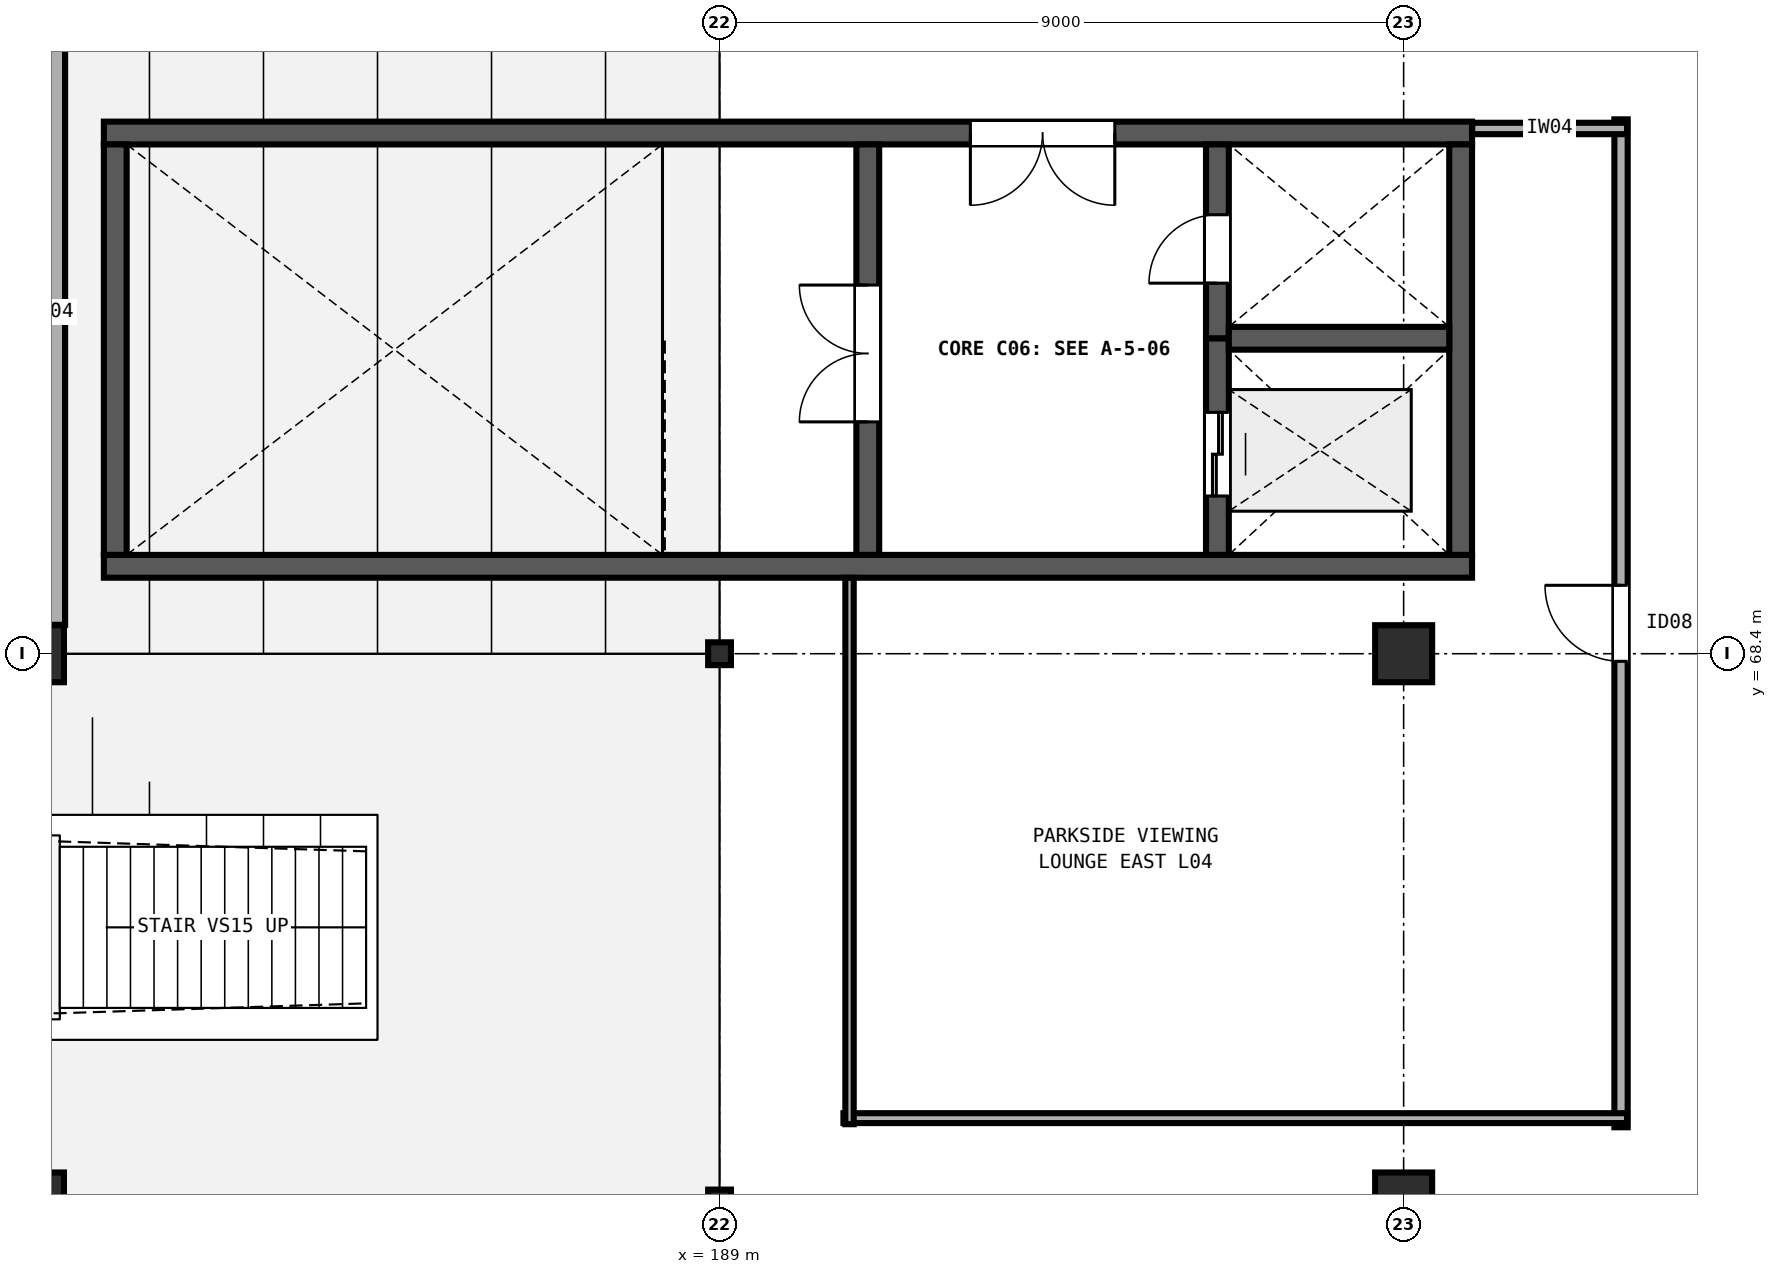
"""IFC4 building model, lengths in metres.
Left out: names, types, materials, properties, quantities, classifications, styles, units other than length and angle.
Written with IfcOpenShell. Run it as: python <this file> out.ifc"""

import sys

from ifc_helpers import new_model, si_unit, direction, frame, frame_2d, origin, origin_2d, place, context, subcontext, project, spatial, rectangle, hollow_rectangle, extrude, element, fill, save


model = new_model("IFC4")
c1 = context("Model", 3, precision=1e-05, world=origin(), true_north=direction((0.0, 1.0)))
c2 = subcontext(c1, "Body", "Model", "MODEL_VIEW")
j1 = project(units=[si_unit("LENGTHUNIT", "METRE"), si_unit("PLANEANGLEUNIT", "RADIAN")], contexts=[c1])
p1 = place(None, origin())
s1 = spatial("IfcSite", under=j1, at=p1, CompositionType="ELEMENT")
p2 = place(p1, origin())
s2 = spatial("IfcBuilding", under=s1, at=p2, CompositionType="ELEMENT")
p3 = place(p2, frame((0.0, 0.0, 19.2)))
s3 = spatial("IfcBuildingStorey", under=s2, at=p3, CompositionType="ELEMENT", Elevation=19.2)
for number, where, z_axis, x_axis in (
    (1, (180.0, 61.2, 0.0), (0.0, 0.0, 1.0), (1.0, 0.0, 0.0)),
    (2, (180.0, 68.4, 0.0), (0.0, 0.0, 1.0), (1.0, 0.0, 0.0)),
):
    element("IfcColumn", number, at=place(p3, frame(where, z_axis=z_axis, x_axis=x_axis)), inside=s3, PredefinedType="COLUMN", context=c2, shape_type="SweptSolid", body=[
        extrude(rectangle(XDim=0.75, YDim=0.75, at=origin_2d()), origin(), (0.0, 0.0, 1.0), 4.8),
    ])
for number, where, z_axis, x_axis in (
    (3, (189.0, 61.2, 0.0), (0.0, 0.0, 1.0), (1.0, 0.0, 0.0)),
    (4, (189.0, 68.4, 0.0), (0.0, 0.0, 1.0), (1.0, 0.0, 0.0)),
):
    element("IfcColumn", number, at=place(p3, frame(where, z_axis=z_axis, x_axis=x_axis)), inside=s3, PredefinedType="COLUMN", context=c2, shape_type="SweptSolid", body=[
        extrude(hollow_rectangle(XDim=0.3, YDim=0.3, WallThickness=0.012, at=origin_2d()), origin(), (0.0, 0.0, 1.0), 4.8),
    ])
for number, where, z_axis, x_axis in (
    (5, (198.0, 61.2, 0.0), (0.0, 0.0, 1.0), (1.0, 0.0, 0.0)),
    (6, (198.0, 68.4, 0.0), (0.0, 0.0, 1.0), (1.0, 0.0, 0.0)),
):
    element("IfcColumn", number, at=place(p3, frame(where, z_axis=z_axis, x_axis=x_axis)), inside=s3, PredefinedType="COLUMN", context=c2, shape_type="SweptSolid", body=[
        extrude(rectangle(XDim=0.75, YDim=0.75, at=origin_2d()), origin(), (0.0, 0.0, 1.0), 4.8),
    ])
p4 = place(p3, frame((180.9, 69.55, 0.0), z_axis=(0.0, 0.0, 1.0), x_axis=(1.0, 0.0, 0.0)))
e7 = element("IfcWall", 7, at=p4, inside=s3, PredefinedType="SHEAR", context=c2, shape_type="SweptSolid", body=[
    extrude(rectangle(XDim=18.0, YDim=0.3, at=frame_2d((9.0, 0.0))), origin(), (0.0, 0.0, 1.0), 4.555),
])
p5 = place(p3, frame((198.9, 75.25, 0.0), z_axis=(0.0, 0.0, 1.0), x_axis=(-1.0, 0.0, 0.0)))
e8 = element("IfcWall", 8, at=p5, inside=s3, PredefinedType="SHEAR", context=c2, shape_type="SweptSolid", body=[
    extrude(rectangle(XDim=18.0, YDim=0.3, at=frame_2d((9.0, 0.0))), origin(), (0.0, 0.0, 1.0), 4.555),
])
p6 = place(p5, frame((4.7, 0.0, 0.0)))
e9 = element("IfcOpeningElement", 9, at=p6, cuts=e8, PredefinedType="OPENING", context=c2, shape_type="SweptSolid", body=[
    extrude(rectangle(XDim=1.9, YDim=2.25, at=frame_2d((0.95, 1.125))), frame((0.0, 0.16, 0.0), z_axis=(0.0, -1.0, 0.0), x_axis=(1.0, 0.0, 0.0)), (0.0, 0.0, 1.0), 0.32),
])
for number, where, z_axis, x_axis in (
    (10, (181.05, 75.1, 0.0), (0.0, 0.0, 1.0), (0.0, -1.0, 0.0)),
    (11, (198.75, 69.7, 0.0), (0.0, 0.0, 1.0), (0.0, 1.0, 0.0)),
):
    element("IfcWall", number, at=place(p3, frame(where, z_axis=z_axis, x_axis=x_axis)), inside=s3, PredefinedType="SHEAR", context=c2, shape_type="SweptSolid", body=[
        extrude(rectangle(XDim=5.4, YDim=0.3, at=frame_2d((2.7, 0.0))), origin(), (0.0, 0.0, 1.0), 4.555),
    ])
p7 = place(p3, frame((190.95, 69.7, 0.0), z_axis=(0.0, 0.0, 1.0), x_axis=(0.0, 1.0, 0.0)))
e12 = element("IfcWall", 12, at=p7, inside=s3, PredefinedType="SHEAR", context=c2, shape_type="SweptSolid", body=[
    extrude(rectangle(XDim=5.4, YDim=0.3, at=frame_2d((2.7, 0.0))), origin(), (0.0, 0.0, 1.0), 4.555),
])
p8 = place(p7, frame((1.75, 0.0, 0.0)))
e13 = element("IfcOpeningElement", 13, at=p8, cuts=e12, PredefinedType="OPENING", context=c2, shape_type="SweptSolid", body=[
    extrude(rectangle(XDim=1.8, YDim=2.25, at=frame_2d((0.9, 1.125))), frame((0.0, 0.16, 0.0), z_axis=(0.0, -1.0, 0.0), x_axis=(1.0, 0.0, 0.0)), (0.0, 0.0, 1.0), 0.32),
])
p9 = place(p3, frame((195.55, 69.7, 0.0), z_axis=(0.0, 0.0, 1.0), x_axis=(0.0, 1.0, 0.0)))
e14 = element("IfcWall", 14, at=p9, inside=s3, PredefinedType="SHEAR", context=c2, shape_type="SweptSolid", body=[
    extrude(rectangle(XDim=2.85, YDim=0.3, at=frame_2d((1.425, 0.0))), origin(), (0.0, 0.0, 1.0), 4.555),
])
p10 = place(p9, frame((0.775, 0.0, 0.0)))
e15 = element("IfcOpeningElement", 15, at=p10, cuts=e14, PredefinedType="OPENING", context=c2, shape_type="SweptSolid", body=[
    extrude(rectangle(XDim=1.1, YDim=2.1, at=frame_2d((0.55, 1.05))), frame((0.0, 0.16, 0.0), z_axis=(0.0, -1.0, 0.0), x_axis=(1.0, 0.0, 0.0)), (0.0, 0.0, 1.0), 0.32),
])
p11 = place(p3, frame((195.55, 72.55, 0.0), z_axis=(0.0, 0.0, 1.0), x_axis=(0.0, 1.0, 0.0)))
e16 = element("IfcWall", 16, at=p11, inside=s3, PredefinedType="SHEAR", context=c2, shape_type="SweptSolid", body=[
    extrude(rectangle(XDim=2.55, YDim=0.3, at=frame_2d((1.275, 0.0))), origin(), (0.0, 0.0, 1.0), 4.555),
])
p12 = place(p11, frame((0.725, 0.0, 0.0)))
e17 = element("IfcOpeningElement", 17, at=p12, cuts=e16, PredefinedType="OPENING", context=c2, shape_type="SweptSolid", body=[
    extrude(rectangle(XDim=0.9, YDim=2.1, at=frame_2d((0.45, 1.05))), frame((0.0, 0.16, 0.0), z_axis=(0.0, -1.0, 0.0), x_axis=(1.0, 0.0, 0.0)), (0.0, 0.0, 1.0), 0.32),
])
p13 = place(p3, frame((195.7, 72.55, 0.0), z_axis=(0.0, 0.0, 1.0), x_axis=(1.0, 0.0, 0.0)))
e18 = element("IfcWall", 18, at=p13, inside=s3, PredefinedType="SHEAR", context=c2, shape_type="SweptSolid", body=[
    extrude(rectangle(XDim=2.9, YDim=0.3, at=frame_2d((1.45, 0.0))), origin(), (0.0, 0.0, 1.0), 4.555),
])
p14 = place(p3, frame((180.2, 68.78, 0.0), z_axis=(0.0, 0.0, 1.0), x_axis=(0.0, 1.0, 0.0)))
e19 = element("IfcWall", 19, at=p14, inside=s3, PredefinedType="SOLIDWALL", context=c2, shape_type="SweptSolid", body=[
    extrude(rectangle(XDim=8.24, YDim=0.38, at=frame_2d((4.12, 0.0))), origin(), (0.0, 0.0, 1.0), 3.28),
])
p15 = place(p3, frame((200.86, 62.17, 0.0), z_axis=(0.0, 0.0, 1.0), x_axis=(0.0, 1.0, 0.0)))
e20 = element("IfcWall", 20, at=p15, inside=s3, PredefinedType="PARTITIONING", context=c2, shape_type="SweptSolid", body=[
    extrude(rectangle(XDim=13.26, YDim=0.175, at=frame_2d((6.63, 0.0))), origin(), (0.0, 0.0, 1.0), 3.28),
])
p16 = place(p15, frame((6.13, 0.0, 0.0)))
e21 = element("IfcOpeningElement", 21, at=p16, cuts=e20, PredefinedType="OPENING", context=c2, shape_type="SweptSolid", body=[
    extrude(rectangle(XDim=1.0, YDim=2.1, at=frame_2d((0.5, 1.05))), frame((0.0, 0.097, 0.0), z_axis=(0.0, -1.0, 0.0), x_axis=(1.0, 0.0, 0.0)), (0.0, 0.0, 1.0), 0.195),
])
p17 = place(p3, frame((198.902, 75.31, 0.0), z_axis=(0.0, 0.0, 1.0), x_axis=(1.0, 0.0, 0.0)))
e22 = element("IfcWall", 22, at=p17, inside=s3, PredefinedType="PARTITIONING", context=c2, shape_type="SweptSolid", body=[
    extrude(rectangle(XDim=2.038, YDim=0.15, at=frame_2d((1.019, 0.0))), origin(), (0.0, 0.0, 1.0), 3.28),
])
p18 = place(p3, frame((200.94, 62.29, 0.0), z_axis=(0.0, 0.0, 1.0), x_axis=(-1.0, 0.0, 0.0)))
e23 = element("IfcWall", 23, at=p18, inside=s3, PredefinedType="PARTITIONING", context=c2, shape_type="SweptSolid", body=[
    extrude(rectangle(XDim=10.31, YDim=0.13, at=frame_2d((5.155, 0.0))), origin(), (0.0, 0.0, 1.0), 3.28),
])
p19 = place(p3, frame((190.71, 62.21, 0.0), z_axis=(0.0, 0.0, 1.0), x_axis=(0.0, 1.0, 0.0)))
e24 = element("IfcWall", 24, at=p19, inside=s3, PredefinedType="PARTITIONING", context=c2, shape_type="SweptSolid", body=[
    extrude(rectangle(XDim=7.188, YDim=0.11, at=frame_2d((3.594, 0.0))), origin(), (0.0, 0.0, 1.0), 3.28),
])
p20 = place(p8, origin())
e25 = element("IfcDoor", 25, at=p20, inside=s3, OperationType="DOUBLE_DOOR_SINGLE_SWING", PredefinedType="DOOR", context=c2, shape_type="SweptSolid", body=[
    extrude(rectangle(XDim=1.8, YDim=2.25, at=frame_2d((0.9, 1.125))), frame((0.0, 0.025, 0.0), z_axis=(0.0, -1.0, 0.0), x_axis=(1.0, 0.0, 0.0)), (0.0, 0.0, 1.0), 0.05),
])
fill(e13, e25)
p21 = place(p12, origin())
e26 = element("IfcDoor", 26, at=p21, inside=s3, OperationType="SINGLE_SWING_LEFT", PredefinedType="DOOR", context=c2, shape_type="SweptSolid", body=[
    extrude(rectangle(XDim=0.9, YDim=2.1, at=frame_2d((0.45, 1.05))), frame((0.0, 0.025, 0.0), z_axis=(0.0, -1.0, 0.0), x_axis=(1.0, 0.0, 0.0)), (0.0, 0.0, 1.0), 0.05),
])
fill(e17, e26)
p22 = place(p10, origin())
e27 = element("IfcDoor", 27, at=p22, inside=s3, OperationType="DOUBLE_DOOR_SLIDING", PredefinedType="DOOR", context=c2, shape_type="SweptSolid", body=[
    extrude(rectangle(XDim=1.1, YDim=2.1, at=frame_2d((0.55, 1.05))), frame((0.0, 0.025, 0.0), z_axis=(0.0, -1.0, 0.0), x_axis=(1.0, 0.0, 0.0)), (0.0, 0.0, 1.0), 0.05),
])
fill(e15, e27)
p23 = place(p6, origin())
e28 = element("IfcDoor", 28, at=p23, inside=s3, OperationType="DOUBLE_DOOR_SINGLE_SWING", PredefinedType="DOOR", context=c2, shape_type="SweptSolid", body=[
    extrude(rectangle(XDim=1.9, YDim=2.25, at=frame_2d((0.95, 1.125))), frame((0.0, 0.025, 0.0), z_axis=(0.0, -1.0, 0.0), x_axis=(1.0, 0.0, 0.0)), (0.0, 0.0, 1.0), 0.05),
])
fill(e9, e28)
p24 = place(p16, origin())
e29 = element("IfcDoor", 29, at=p24, inside=s3, OperationType="SINGLE_SWING_RIGHT", PredefinedType="DOOR", context=c2, shape_type="SweptSolid", body=[
    extrude(rectangle(XDim=1.0, YDim=2.1, at=frame_2d((0.5, 1.05))), frame((0.0, 0.025, 0.0), z_axis=(0.0, -1.0, 0.0), x_axis=(1.0, 0.0, 0.0)), (0.0, 0.0, 1.0), 0.05),
])
fill(e21, e29)
save(model, sys.argv[1])
